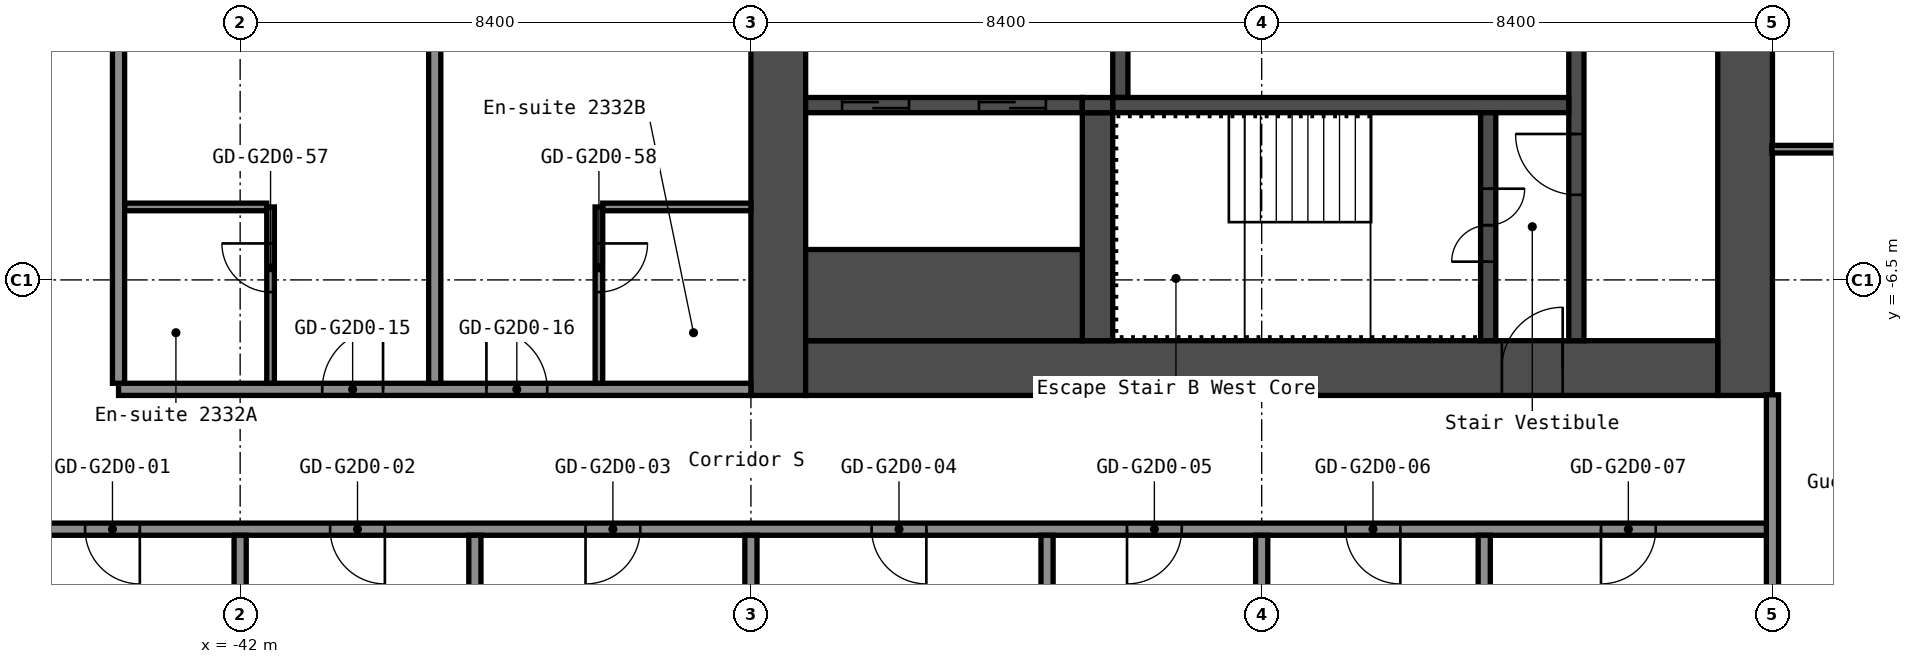
"""IFC4 building model, lengths in metres.
Left out: names, types, materials, properties, quantities, classifications, styles, units other than length and angle.
Written with IfcOpenShell. Run it as: python <this file> out.ifc"""

import sys

from ifc_helpers import new_model, si_unit, direction, frame, frame_2d, origin, place, context, subcontext, project, spatial, rectangle, extrude, element, fill, save


model = new_model("IFC4")
c1 = context("Model", 3, precision=1e-05, world=origin(), true_north=direction((0.0, 1.0)))
c2 = subcontext(c1, "Body", "Model", "MODEL_VIEW")
j1 = project(units=[si_unit("LENGTHUNIT", "METRE"), si_unit("PLANEANGLEUNIT", "RADIAN")], contexts=[c1])
p1 = place(None, origin())
s1 = spatial("IfcSite", under=j1, at=p1, CompositionType="ELEMENT")
p2 = place(p1, origin())
s2 = spatial("IfcBuilding", under=s1, at=p2, CompositionType="ELEMENT")
p3 = place(p2, frame((0.0, 0.0, 85.0)))
s3 = spatial("IfcBuildingStorey", under=s2, at=p3, CompositionType="ELEMENT", Elevation=85.0)
p4 = place(p3, frame((-17.25, -8.4, 0.0), z_axis=(0.0, 0.0, 1.0), x_axis=(0.0, 1.0, 0.0)))
e1 = element("IfcWall", 1, at=p4, inside=s3, PredefinedType="SHEAR", context=c2, shape_type="SweptSolid", body=[
    extrude(rectangle(XDim=16.8, YDim=0.9, at=frame_2d((8.4, 0.0))), origin(), (0.0, 0.0, 1.0), 2.8),
])
p5 = place(p4, frame((7.6, 0.0, 0.0)))
e2 = element("IfcOpeningElement", 2, at=p5, cuts=e1, PredefinedType="OPENING", context=c2, shape_type="SweptSolid", body=[
    extrude(rectangle(XDim=1.2, YDim=2.1, at=frame_2d((0.6, 1.05))), frame((0.0, 0.46, 0.0), z_axis=(0.0, -1.0, 0.0), x_axis=(1.0, 0.0, 0.0)), (0.0, 0.0, 1.0), 0.92),
])
p6 = place(p3, frame((-33.15, -8.4, 0.0), z_axis=(0.0, 0.0, 1.0), x_axis=(0.0, 1.0, 0.0)))
e3 = element("IfcWall", 3, at=p6, inside=s3, PredefinedType="SHEAR", context=c2, shape_type="SweptSolid", body=[
    extrude(rectangle(XDim=16.8, YDim=0.9, at=frame_2d((8.4, 0.0))), origin(), (0.0, 0.0, 1.0), 2.8),
])
p7 = place(p3, frame((-32.7, -7.95, 0.0), z_axis=(0.0, 0.0, 1.0), x_axis=(1.0, 0.0, 0.0)))
e4 = element("IfcWall", 4, at=p7, inside=s3, PredefinedType="SHEAR", context=c2, shape_type="SweptSolid", body=[
    extrude(rectangle(XDim=15.0, YDim=0.9, at=frame_2d((7.5, 0.0))), origin(), (0.0, 0.0, 1.0), 2.8),
])
p8 = place(p7, frame((11.45, 0.0, 0.0)))
e5 = element("IfcOpeningElement", 5, at=p8, cuts=e4, PredefinedType="OPENING", context=c2, shape_type="SweptSolid", body=[
    extrude(rectangle(XDim=1.0, YDim=2.1, at=frame_2d((0.5, 1.05))), frame((0.0, 0.46, 0.0), z_axis=(0.0, -1.0, 0.0), x_axis=(1.0, 0.0, 0.0)), (0.0, 0.0, 1.0), 0.92),
])
p9 = place(p3, frame((-20.025, -7.5, 0.0), z_axis=(0.0, 0.0, 1.0), x_axis=(0.0, 1.0, 0.0)))
e6 = element("IfcWall", 6, at=p9, inside=s3, PredefinedType="SHEAR", context=c2, shape_type="SweptSolid", body=[
    extrude(rectangle(XDim=6.3, YDim=0.25, at=frame_2d((3.15, 0.0))), origin(), (0.0, 0.0, 1.0), 2.8),
])
p10 = place(p9, frame((2.4, 0.0, 0.0)))
e7 = element("IfcOpeningElement", 7, at=p10, cuts=e6, PredefinedType="OPENING", context=c2, shape_type="SweptSolid", body=[
    extrude(rectangle(XDim=1.0, YDim=2.1, at=frame_2d((0.5, 1.05))), frame((0.0, 0.135, 0.0), z_axis=(0.0, -1.0, 0.0), x_axis=(1.0, 0.0, 0.0)), (0.0, 0.0, 1.0), 0.27),
])
p11 = place(p3, frame((-27.525, -3.5, 0.0), z_axis=(0.0, 0.0, 1.0), x_axis=(0.0, 1.0, 0.0)))
e8 = element("IfcWall", 8, at=p11, inside=s3, PredefinedType="SHEAR", context=c2, shape_type="SweptSolid", body=[
    extrude(rectangle(XDim=2.05, YDim=0.25, at=frame_2d((1.025, 0.0))), origin(), (0.0, 0.0, 1.0), 2.8),
])
p12 = place(p3, frame((-27.65, -3.625, 0.0), z_axis=(0.0, 0.0, 1.0), x_axis=(1.0, 0.0, 0.0)))
e9 = element("IfcWall", 9, at=p12, inside=s3, PredefinedType="SHEAR", context=c2, shape_type="SweptSolid", body=[
    extrude(rectangle(XDim=7.5, YDim=0.25, at=frame_2d((3.75, 0.0))), origin(), (0.0, 0.0, 1.0), 2.8),
])
p13 = place(p3, frame((-21.475, -7.5, 0.0), z_axis=(0.0, 0.0, 1.0), x_axis=(0.0, 1.0, 0.0)))
e10 = element("IfcWall", 10, at=p13, inside=s3, PredefinedType="SHEAR", context=c2, shape_type="SweptSolid", body=[
    extrude(rectangle(XDim=3.75, YDim=0.25, at=frame_2d((1.875, 0.0))), origin(), (0.0, 0.0, 1.0), 2.8),
])
p14 = place(p13, frame((1.3, 0.0, 0.0)))
e11 = element("IfcOpeningElement", 11, at=p14, cuts=e10, PredefinedType="OPENING", context=c2, shape_type="SweptSolid", body=[
    extrude(rectangle(XDim=1.2, YDim=2.1, at=frame_2d((0.6, 1.05))), frame((0.0, 0.135, 0.0), z_axis=(0.0, -1.0, 0.0), x_axis=(1.0, 0.0, 0.0)), (0.0, 0.0, 1.0), 0.27),
])
p15 = place(p3, frame((-27.9, -7.5, 0.0), z_axis=(0.0, 0.0, 1.0), x_axis=(0.0, 1.0, 0.0)))
e12 = element("IfcWall", 12, at=p15, inside=s3, PredefinedType="SHEAR", context=c2, shape_type="SweptSolid", body=[
    extrude(rectangle(XDim=3.75, YDim=0.5, at=frame_2d((1.875, 0.0))), origin(), (0.0, 0.0, 1.0), 2.8),
])
p16 = place(p3, frame((-32.7, -3.625, 0.0), z_axis=(0.0, 0.0, 1.0), x_axis=(1.0, 0.0, 0.0)))
e13 = element("IfcWall", 13, at=p16, inside=s3, PredefinedType="SHEAR", context=c2, shape_type="SweptSolid", body=[
    extrude(rectangle(XDim=4.55, YDim=0.25, at=frame_2d((2.275, 0.0))), origin(), (0.0, 0.0, 1.0), 2.8),
])
p17 = place(p16, frame((2.85, 0.0, 0.0)))
e14 = element("IfcOpeningElement", 14, at=p17, cuts=e13, PredefinedType="OPENING", context=c2, shape_type="SweptSolid", body=[
    extrude(rectangle(XDim=1.1, YDim=2.1, at=frame_2d((0.55, 1.05))), frame((0.0, 0.135, 0.0), z_axis=(0.0, -1.0, 0.0), x_axis=(1.0, 0.0, 0.0)), (0.0, 0.0, 1.0), 0.27),
])
p18 = place(p16, frame((0.6, 0.0, 0.0)))
e15 = element("IfcOpeningElement", 15, at=p18, cuts=e13, PredefinedType="OPENING", context=c2, shape_type="SweptSolid", body=[
    extrude(rectangle(XDim=1.1, YDim=2.1, at=frame_2d((0.55, 1.05))), frame((0.0, 0.135, 0.0), z_axis=(0.0, -1.0, 0.0), x_axis=(1.0, 0.0, 0.0)), (0.0, 0.0, 1.0), 0.27),
])
p19 = place(p3, frame((-32.7, -6.75, 0.0), z_axis=(0.0, 0.0, 1.0), x_axis=(1.0, 0.0, 0.0)))
e16 = element("IfcWall", 16, at=p19, inside=s3, PredefinedType="SHEAR", context=c2, shape_type="SweptSolid", body=[
    extrude(rectangle(XDim=4.55, YDim=1.5, at=frame_2d((2.275, 0.0))), origin(), (0.0, 0.0, 1.0), 2.8),
])
p20 = place(p3, frame((-28.15, -3.625, 0.0), z_axis=(0.0, 0.0, 1.0), x_axis=(1.0, 0.0, 0.0)))
e17 = element("IfcWall", 17, at=p20, inside=s3, PredefinedType="SHEAR", context=c2, shape_type="SweptSolid", body=[
    extrude(rectangle(XDim=0.5, YDim=0.25, at=frame_2d((0.25, 0.0))), origin(), (0.0, 0.0, 1.0), 2.8),
])
p21 = place(p3, frame((-46.5, -10.6, 0.0), z_axis=(0.0, 0.0, 1.0), x_axis=(1.0, 0.0, 0.0)))
e18 = element("IfcWall", 18, at=p21, inside=s3, PredefinedType="PARTITIONING", context=c2, shape_type="SweptSolid", body=[
    extrude(rectangle(XDim=29.7, YDim=0.2, at=frame_2d((14.85, 0.0))), origin(), (0.0, 0.0, 1.0), 2.8),
])
p22 = place(p21, frame((1.95, 0.0, 0.0)))
e19 = element("IfcOpeningElement", 19, at=p22, cuts=e18, PredefinedType="OPENING", context=c2, shape_type="SweptSolid", body=[
    extrude(rectangle(XDim=0.9, YDim=2.1, at=frame_2d((0.45, 1.05))), frame((0.0, 0.11, 0.0), z_axis=(0.0, -1.0, 0.0), x_axis=(1.0, 0.0, 0.0)), (0.0, 0.0, 1.0), 0.22),
])
p23 = place(p21, frame((5.98, 0.0, 0.0)))
e20 = element("IfcOpeningElement", 20, at=p23, cuts=e18, PredefinedType="OPENING", context=c2, shape_type="SweptSolid", body=[
    extrude(rectangle(XDim=0.9, YDim=2.1, at=frame_2d((0.45, 1.05))), frame((0.0, 0.11, 0.0), z_axis=(0.0, -1.0, 0.0), x_axis=(1.0, 0.0, 0.0)), (0.0, 0.0, 1.0), 0.22),
])
p24 = place(p21, frame((10.18, 0.0, 0.0)))
e21 = element("IfcOpeningElement", 21, at=p24, cuts=e18, PredefinedType="OPENING", context=c2, shape_type="SweptSolid", body=[
    extrude(rectangle(XDim=0.9, YDim=2.1, at=frame_2d((0.45, 1.05))), frame((0.0, 0.11, 0.0), z_axis=(0.0, -1.0, 0.0), x_axis=(1.0, 0.0, 0.0)), (0.0, 0.0, 1.0), 0.22),
])
p25 = place(p21, frame((14.885, 0.0, 0.0)))
e22 = element("IfcOpeningElement", 22, at=p25, cuts=e18, PredefinedType="OPENING", context=c2, shape_type="SweptSolid", body=[
    extrude(rectangle(XDim=0.9, YDim=2.1, at=frame_2d((0.45, 1.05))), frame((0.0, 0.11, 0.0), z_axis=(0.0, -1.0, 0.0), x_axis=(1.0, 0.0, 0.0)), (0.0, 0.0, 1.0), 0.22),
])
p26 = place(p21, frame((19.085, 0.0, 0.0)))
e23 = element("IfcOpeningElement", 23, at=p26, cuts=e18, PredefinedType="OPENING", context=c2, shape_type="SweptSolid", body=[
    extrude(rectangle(XDim=0.9, YDim=2.1, at=frame_2d((0.45, 1.05))), frame((0.0, 0.11, 0.0), z_axis=(0.0, -1.0, 0.0), x_axis=(1.0, 0.0, 0.0)), (0.0, 0.0, 1.0), 0.22),
])
p27 = place(p21, frame((22.68, 0.0, 0.0)))
e24 = element("IfcOpeningElement", 24, at=p27, cuts=e18, PredefinedType="OPENING", context=c2, shape_type="SweptSolid", body=[
    extrude(rectangle(XDim=0.9, YDim=2.1, at=frame_2d((0.45, 1.05))), frame((0.0, 0.11, 0.0), z_axis=(0.0, -1.0, 0.0), x_axis=(1.0, 0.0, 0.0)), (0.0, 0.0, 1.0), 0.22),
])
p28 = place(p21, frame((26.88, 0.0, 0.0)))
e25 = element("IfcOpeningElement", 25, at=p28, cuts=e18, PredefinedType="OPENING", context=c2, shape_type="SweptSolid", body=[
    extrude(rectangle(XDim=0.9, YDim=2.1, at=frame_2d((0.45, 1.05))), frame((0.0, 0.11, 0.0), z_axis=(0.0, -1.0, 0.0), x_axis=(1.0, 0.0, 0.0)), (0.0, 0.0, 1.0), 0.22),
])
p29 = place(p3, frame((-44.0, -8.3, 0.0), z_axis=(0.0, 0.0, 1.0), x_axis=(1.0, 0.0, 0.0)))
e26 = element("IfcWall", 26, at=p29, inside=s3, PredefinedType="PARTITIONING", context=c2, shape_type="SweptSolid", body=[
    extrude(rectangle(XDim=10.4, YDim=0.2, at=frame_2d((5.2, 0.0))), origin(), (0.0, 0.0, 1.0), 2.8),
])
p30 = place(p29, frame((3.35, 0.0, 0.0)))
e27 = element("IfcOpeningElement", 27, at=p30, cuts=e26, PredefinedType="OPENING", context=c2, shape_type="SweptSolid", body=[
    extrude(rectangle(XDim=1.0, YDim=2.1, at=frame_2d((0.5, 1.05))), frame((0.0, 0.11, 0.0), z_axis=(0.0, -1.0, 0.0), x_axis=(1.0, 0.0, 0.0)), (0.0, 0.0, 1.0), 0.22),
])
p31 = place(p29, frame((6.05, 0.0, 0.0)))
e28 = element("IfcOpeningElement", 28, at=p31, cuts=e26, PredefinedType="OPENING", context=c2, shape_type="SweptSolid", body=[
    extrude(rectangle(XDim=1.0, YDim=2.1, at=frame_2d((0.5, 1.05))), frame((0.0, 0.11, 0.0), z_axis=(0.0, -1.0, 0.0), x_axis=(1.0, 0.0, 0.0)), (0.0, 0.0, 1.0), 0.22),
])
p32 = place(p3, frame((-43.9, -5.3, 0.0), z_axis=(0.0, 0.0, 1.0), x_axis=(1.0, 0.0, 0.0)))
e29 = element("IfcWall", 29, at=p32, inside=s3, PredefinedType="PARTITIONING", context=c2, shape_type="SweptSolid", body=[
    extrude(rectangle(XDim=2.337, YDim=0.125, at=frame_2d((1.169, 0.0))), origin(), (0.0, 0.0, 1.0), 2.8),
])
p33 = place(p3, frame((-36.038, -5.3, 0.0), z_axis=(0.0, 0.0, 1.0), x_axis=(1.0, 0.0, 0.0)))
e30 = element("IfcWall", 30, at=p33, inside=s3, PredefinedType="PARTITIONING", context=c2, shape_type="SweptSolid", body=[
    extrude(rectangle(XDim=2.438, YDim=0.125, at=frame_2d((1.219, 0.0))), origin(), (0.0, 0.0, 1.0), 2.8),
])
p34 = place(p3, frame((-16.81, -4.35, 0.0), z_axis=(0.0, 0.0, 1.0), x_axis=(1.0, 0.0, 0.0)))
e31 = element("IfcWall", 31, at=p34, inside=s3, PredefinedType="PARTITIONING", context=c2, shape_type="SweptSolid", body=[
    extrude(rectangle(XDim=2.448, YDim=0.125, at=frame_2d((1.224, 0.0))), origin(), (0.0, 0.0, 1.0), 2.8),
])
p35 = place(p3, frame((-44.0, -8.2, 0.0), z_axis=(0.0, 0.0, 1.0), x_axis=(0.0, 1.0, 0.0)))
e32 = element("IfcWall", 32, at=p35, inside=s3, PredefinedType="PARTITIONING", context=c2, shape_type="SweptSolid", body=[
    extrude(rectangle(XDim=16.4, YDim=0.2, at=frame_2d((8.2, 0.0))), origin(), (0.0, 0.0, 1.0), 2.8),
])
p36 = place(p3, frame((-42.0, -15.55, 0.0), z_axis=(0.0, 0.0, 1.0), x_axis=(0.0, 1.0, 0.0)))
e33 = element("IfcWall", 33, at=p36, inside=s3, PredefinedType="PARTITIONING", context=c2, shape_type="SweptSolid", body=[
    extrude(rectangle(XDim=4.85, YDim=0.2, at=frame_2d((2.425, 0.0))), origin(), (0.0, 0.0, 1.0), 2.8),
])
p37 = place(p3, frame((-41.5, -8.2, 0.0), z_axis=(0.0, 0.0, 1.0), x_axis=(0.0, 1.0, 0.0)))
e34 = element("IfcWall", 34, at=p37, inside=s3, PredefinedType="PARTITIONING", context=c2, shape_type="SweptSolid", body=[
    extrude(rectangle(XDim=2.9, YDim=0.125, at=frame_2d((1.45, 0.0))), origin(), (0.0, 0.0, 1.0), 2.8),
])
p38 = place(p37, frame((1.5, 0.0, 0.0)))
e35 = element("IfcOpeningElement", 35, at=p38, cuts=e34, PredefinedType="OPENING", context=c2, shape_type="SweptSolid", body=[
    extrude(rectangle(XDim=0.8, YDim=2.1, at=frame_2d((0.4, 1.05))), frame((0.0, 0.073, 0.0), z_axis=(0.0, -1.0, 0.0), x_axis=(1.0, 0.0, 0.0)), (0.0, 0.0, 1.0), 0.145),
])
p39 = place(p3, frame((-38.8, -8.2, 0.0), z_axis=(0.0, 0.0, 1.0), x_axis=(0.0, 1.0, 0.0)))
e36 = element("IfcWall", 36, at=p39, inside=s3, PredefinedType="PARTITIONING", context=c2, shape_type="SweptSolid", body=[
    extrude(rectangle(XDim=8.2, YDim=0.2, at=frame_2d((4.1, 0.0))), origin(), (0.0, 0.0, 1.0), 2.8),
])
p40 = place(p3, frame((-38.14, -15.55, 0.0), z_axis=(0.0, 0.0, 1.0), x_axis=(0.0, 1.0, 0.0)))
e37 = element("IfcWall", 37, at=p40, inside=s3, PredefinedType="PARTITIONING", context=c2, shape_type="SweptSolid", body=[
    extrude(rectangle(XDim=4.85, YDim=0.2, at=frame_2d((2.425, 0.0))), origin(), (0.0, 0.0, 1.0), 2.8),
])
p41 = place(p3, frame((-36.1, -8.2, 0.0), z_axis=(0.0, 0.0, 1.0), x_axis=(0.0, 1.0, 0.0)))
e38 = element("IfcWall", 38, at=p41, inside=s3, PredefinedType="PARTITIONING", context=c2, shape_type="SweptSolid", body=[
    extrude(rectangle(XDim=2.9, YDim=0.125, at=frame_2d((1.45, 0.0))), origin(), (0.0, 0.0, 1.0), 2.8),
])
p42 = place(p41, frame((1.5, 0.0, 0.0)))
e39 = element("IfcOpeningElement", 39, at=p42, cuts=e38, PredefinedType="OPENING", context=c2, shape_type="SweptSolid", body=[
    extrude(rectangle(XDim=0.8, YDim=2.1, at=frame_2d((0.4, 1.05))), frame((0.0, 0.073, 0.0), z_axis=(0.0, -1.0, 0.0), x_axis=(1.0, 0.0, 0.0)), (0.0, 0.0, 1.0), 0.145),
])
for number, where, z_axis, x_axis in (
    (40, (-33.6, -15.55, 0.0), (0.0, 0.0, 1.0), (0.0, 1.0, 0.0)),
    (41, (-28.73, -15.55, 0.0), (0.0, 0.0, 1.0), (0.0, 1.0, 0.0)),
    (42, (-25.2, -15.55, 0.0), (0.0, 0.0, 1.0), (0.0, 1.0, 0.0)),
    (43, (-21.54, -15.55, 0.0), (0.0, 0.0, 1.0), (0.0, 1.0, 0.0)),
):
    element("IfcWall", number, at=place(p3, frame(where, z_axis=z_axis, x_axis=x_axis)), inside=s3, PredefinedType="PARTITIONING", context=c2, shape_type="SweptSolid", body=[
        extrude(rectangle(XDim=4.85, YDim=0.2, at=frame_2d((2.425, 0.0))), origin(), (0.0, 0.0, 1.0), 2.8),
    ])
p43 = place(p3, frame((-16.8, -15.55, 0.0), z_axis=(0.0, 0.0, 1.0), x_axis=(0.0, 1.0, 0.0)))
e44 = element("IfcWall", 44, at=p43, inside=s3, PredefinedType="PARTITIONING", context=c2, shape_type="SweptSolid", body=[
    extrude(rectangle(XDim=7.16, YDim=0.2, at=frame_2d((3.58, 0.0))), origin(), (0.0, 0.0, 1.0), 2.8),
])
p44 = place(p8, origin())
e45 = element("IfcDoor", 45, at=p44, inside=s3, OperationType="SINGLE_SWING_LEFT", PredefinedType="DOOR", context=c2, shape_type="SweptSolid", body=[
    extrude(rectangle(XDim=1.0, YDim=2.1, at=frame_2d((0.5, 1.05))), frame((0.0, 0.025, 0.0), z_axis=(0.0, -1.0, 0.0), x_axis=(1.0, 0.0, 0.0)), (0.0, 0.0, 1.0), 0.05),
])
fill(e5, e45)
p45 = place(p14, origin())
e46 = element("IfcDoor", 46, at=p45, inside=s3, OperationType="DOUBLE_DOOR_SINGLE_SWING", PredefinedType="DOOR", context=c2, shape_type="SweptSolid", body=[
    extrude(rectangle(XDim=1.2, YDim=2.1, at=frame_2d((0.6, 1.05))), frame((0.0, 0.025, 0.0), z_axis=(0.0, -1.0, 0.0), x_axis=(1.0, 0.0, 0.0)), (0.0, 0.0, 1.0), 0.05),
])
fill(e11, e46)
p46 = place(p10, origin())
e47 = element("IfcDoor", 47, at=p46, inside=s3, OperationType="SINGLE_SWING_LEFT", PredefinedType="DOOR", context=c2, shape_type="SweptSolid", body=[
    extrude(rectangle(XDim=1.0, YDim=2.1, at=frame_2d((0.5, 1.05))), frame((0.0, 0.025, 0.0), z_axis=(0.0, -1.0, 0.0), x_axis=(1.0, 0.0, 0.0)), (0.0, 0.0, 1.0), 0.05),
])
fill(e7, e47)
p47 = place(p17, origin())
e48 = element("IfcDoor", 48, at=p47, inside=s3, OperationType="DOUBLE_DOOR_SLIDING", PredefinedType="DOOR", context=c2, shape_type="SweptSolid", body=[
    extrude(rectangle(XDim=1.1, YDim=2.1, at=frame_2d((0.55, 1.05))), frame((0.0, 0.025, 0.0), z_axis=(0.0, -1.0, 0.0), x_axis=(1.0, 0.0, 0.0)), (0.0, 0.0, 1.0), 0.05),
])
fill(e14, e48)
p48 = place(p18, origin())
e49 = element("IfcDoor", 49, at=p48, inside=s3, OperationType="DOUBLE_DOOR_SLIDING", PredefinedType="DOOR", context=c2, shape_type="SweptSolid", body=[
    extrude(rectangle(XDim=1.1, YDim=2.1, at=frame_2d((0.55, 1.05))), frame((0.0, 0.025, 0.0), z_axis=(0.0, -1.0, 0.0), x_axis=(1.0, 0.0, 0.0)), (0.0, 0.0, 1.0), 0.05),
])
fill(e15, e49)
p49 = place(p22, origin())
e50 = element("IfcDoor", 50, at=p49, inside=s3, OperationType="SINGLE_SWING_RIGHT", PredefinedType="DOOR", context=c2, shape_type="SweptSolid", body=[
    extrude(rectangle(XDim=0.9, YDim=2.1, at=frame_2d((0.45, 1.05))), frame((0.0, 0.025, 0.0), z_axis=(0.0, -1.0, 0.0), x_axis=(1.0, 0.0, 0.0)), (0.0, 0.0, 1.0), 0.05),
])
fill(e19, e50)
p50 = place(p23, origin())
e51 = element("IfcDoor", 51, at=p50, inside=s3, OperationType="SINGLE_SWING_RIGHT", PredefinedType="DOOR", context=c2, shape_type="SweptSolid", body=[
    extrude(rectangle(XDim=0.9, YDim=2.1, at=frame_2d((0.45, 1.05))), frame((0.0, 0.025, 0.0), z_axis=(0.0, -1.0, 0.0), x_axis=(1.0, 0.0, 0.0)), (0.0, 0.0, 1.0), 0.05),
])
fill(e20, e51)
p51 = place(p24, origin())
e52 = element("IfcDoor", 52, at=p51, inside=s3, OperationType="SINGLE_SWING_LEFT", PredefinedType="DOOR", context=c2, shape_type="SweptSolid", body=[
    extrude(rectangle(XDim=0.9, YDim=2.1, at=frame_2d((0.45, 1.05))), frame((0.0, 0.025, 0.0), z_axis=(0.0, -1.0, 0.0), x_axis=(1.0, 0.0, 0.0)), (0.0, 0.0, 1.0), 0.05),
])
fill(e21, e52)
p52 = place(p25, origin())
e53 = element("IfcDoor", 53, at=p52, inside=s3, OperationType="SINGLE_SWING_RIGHT", PredefinedType="DOOR", context=c2, shape_type="SweptSolid", body=[
    extrude(rectangle(XDim=0.9, YDim=2.1, at=frame_2d((0.45, 1.05))), frame((0.0, 0.025, 0.0), z_axis=(0.0, -1.0, 0.0), x_axis=(1.0, 0.0, 0.0)), (0.0, 0.0, 1.0), 0.05),
])
fill(e22, e53)
p53 = place(p26, origin())
e54 = element("IfcDoor", 54, at=p53, inside=s3, OperationType="SINGLE_SWING_LEFT", PredefinedType="DOOR", context=c2, shape_type="SweptSolid", body=[
    extrude(rectangle(XDim=0.9, YDim=2.1, at=frame_2d((0.45, 1.05))), frame((0.0, 0.025, 0.0), z_axis=(0.0, -1.0, 0.0), x_axis=(1.0, 0.0, 0.0)), (0.0, 0.0, 1.0), 0.05),
])
fill(e23, e54)
p54 = place(p27, origin())
e55 = element("IfcDoor", 55, at=p54, inside=s3, OperationType="SINGLE_SWING_RIGHT", PredefinedType="DOOR", context=c2, shape_type="SweptSolid", body=[
    extrude(rectangle(XDim=0.9, YDim=2.1, at=frame_2d((0.45, 1.05))), frame((0.0, 0.025, 0.0), z_axis=(0.0, -1.0, 0.0), x_axis=(1.0, 0.0, 0.0)), (0.0, 0.0, 1.0), 0.05),
])
fill(e24, e55)
p55 = place(p28, origin())
e56 = element("IfcDoor", 56, at=p55, inside=s3, OperationType="SINGLE_SWING_LEFT", PredefinedType="DOOR", context=c2, shape_type="SweptSolid", body=[
    extrude(rectangle(XDim=0.9, YDim=2.1, at=frame_2d((0.45, 1.05))), frame((0.0, 0.025, 0.0), z_axis=(0.0, -1.0, 0.0), x_axis=(1.0, 0.0, 0.0)), (0.0, 0.0, 1.0), 0.05),
])
fill(e25, e56)
p56 = place(p30, origin())
e57 = element("IfcDoor", 57, at=p56, inside=s3, OperationType="SINGLE_SWING_LEFT", PredefinedType="DOOR", context=c2, shape_type="SweptSolid", body=[
    extrude(rectangle(XDim=1.0, YDim=2.1, at=frame_2d((0.5, 1.05))), frame((0.0, 0.025, 0.0), z_axis=(0.0, -1.0, 0.0), x_axis=(1.0, 0.0, 0.0)), (0.0, 0.0, 1.0), 0.05),
])
fill(e27, e57)
p57 = place(p31, origin())
e58 = element("IfcDoor", 58, at=p57, inside=s3, OperationType="SINGLE_SWING_RIGHT", PredefinedType="DOOR", context=c2, shape_type="SweptSolid", body=[
    extrude(rectangle(XDim=1.0, YDim=2.1, at=frame_2d((0.5, 1.05))), frame((0.0, 0.025, 0.0), z_axis=(0.0, -1.0, 0.0), x_axis=(1.0, 0.0, 0.0)), (0.0, 0.0, 1.0), 0.05),
])
fill(e28, e58)
p58 = place(p38, origin())
e59 = element("IfcDoor", 59, at=p58, inside=s3, OperationType="SINGLE_SWING_LEFT", PredefinedType="DOOR", context=c2, shape_type="SweptSolid", body=[
    extrude(rectangle(XDim=0.8, YDim=2.1, at=frame_2d((0.4, 1.05))), frame((0.0, 0.025, 0.0), z_axis=(0.0, -1.0, 0.0), x_axis=(1.0, 0.0, 0.0)), (0.0, 0.0, 1.0), 0.05),
])
fill(e35, e59)
p59 = place(p42, origin())
e60 = element("IfcDoor", 60, at=p59, inside=s3, OperationType="SINGLE_SWING_RIGHT", PredefinedType="DOOR", context=c2, shape_type="SweptSolid", body=[
    extrude(rectangle(XDim=0.8, YDim=2.1, at=frame_2d((0.4, 1.05))), frame((0.0, 0.025, 0.0), z_axis=(0.0, -1.0, 0.0), x_axis=(1.0, 0.0, 0.0)), (0.0, 0.0, 1.0), 0.05),
])
fill(e39, e60)
save(model, sys.argv[1])
